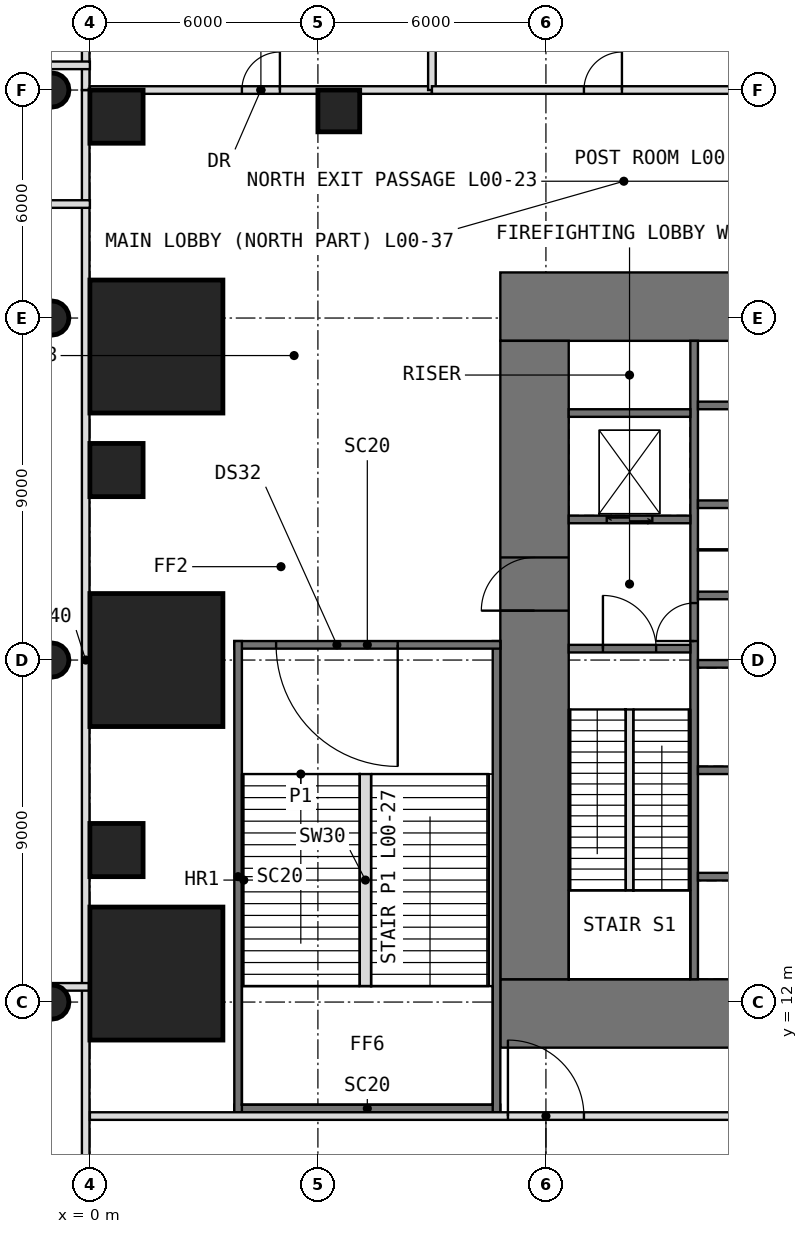
"""IFC4 building model, lengths in metres.
Left out: names, types, materials, properties, quantities, classifications, styles, units other than length and angle.
Written with IfcOpenShell. Run it as: python <this file> out.ifc"""

import sys

from ifc_helpers import new_model, si_unit, direction, frame, frame_2d, origin, origin_2d, place, context, subcontext, project, spatial, rectangle, circle, extrude, element, fill, save


model = new_model("IFC4")
c1 = context("Model", 3, precision=1e-05, world=origin(), true_north=direction((0.0, 1.0)))
c2 = subcontext(c1, "Body", "Model", "MODEL_VIEW")
j1 = project(units=[si_unit("LENGTHUNIT", "METRE"), si_unit("PLANEANGLEUNIT", "RADIAN")], contexts=[c1])
p1 = place(None, origin())
s1 = spatial("IfcSite", under=j1, at=p1, CompositionType="ELEMENT")
p2 = place(p1, origin())
s2 = spatial("IfcBuilding", under=s1, at=p2, CompositionType="ELEMENT")
p3 = place(p2, origin())
s3 = spatial("IfcBuildingStorey", under=s2, at=p3, CompositionType="ELEMENT", Elevation=0.0)
p4 = place(p3, frame((1.75, 12.75, -0.4), z_axis=(0.0, 0.0, 1.0), x_axis=(1.0, 0.0, 0.0)))
e1 = element("IfcColumn", 1, at=p4, inside=s3, PredefinedType="COLUMN", context=c2, shape_type="SweptSolid", body=[
    extrude(rectangle(XDim=3.5, YDim=3.5, at=origin_2d()), origin(), (0.0, 0.0, 1.0), 6.4),
])
p5 = place(p3, frame((-1.0, 12.0, -0.4), z_axis=(0.0, 0.0, 1.0), x_axis=(1.0, 0.0, 0.0)))
e2 = element("IfcColumn", 2, at=p5, inside=s3, PredefinedType="COLUMN", context=c2, shape_type="SweptSolid", body=[
    extrude(circle(Radius=0.45, at=origin_2d()), origin(), (0.0, 0.0, 1.0), 6.4),
])
p6 = place(p3, frame((0.7, 16.0, -0.4), z_axis=(0.0, 0.0, 1.0), x_axis=(1.0, 0.0, 0.0)))
e3 = element("IfcColumn", 3, at=p6, inside=s3, PredefinedType="COLUMN", context=c2, shape_type="SweptSolid", body=[
    extrude(rectangle(XDim=1.4, YDim=1.4, at=origin_2d()), origin(), (0.0, 0.0, 1.0), 6.4),
])
p7 = place(p3, frame((-1.0, 21.0, -0.4), z_axis=(0.0, 0.0, 1.0), x_axis=(1.0, 0.0, 0.0)))
e4 = element("IfcColumn", 4, at=p7, inside=s3, PredefinedType="COLUMN", context=c2, shape_type="SweptSolid", body=[
    extrude(circle(Radius=0.45, at=origin_2d()), origin(), (0.0, 0.0, 1.0), 6.4),
])
p8 = place(p3, frame((1.75, 21.0, -0.4), z_axis=(0.0, 0.0, 1.0), x_axis=(1.0, 0.0, 0.0)))
e5 = element("IfcColumn", 5, at=p8, inside=s3, PredefinedType="COLUMN", context=c2, shape_type="SweptSolid", body=[
    extrude(rectangle(XDim=3.5, YDim=3.5, at=origin_2d()), origin(), (0.0, 0.0, 1.0), 6.4),
])
p9 = place(p3, frame((0.7, 26.0, -0.4), z_axis=(0.0, 0.0, 1.0), x_axis=(1.0, 0.0, 0.0)))
e6 = element("IfcColumn", 6, at=p9, inside=s3, PredefinedType="COLUMN", context=c2, shape_type="SweptSolid", body=[
    extrude(rectangle(XDim=1.4, YDim=1.4, at=origin_2d()), origin(), (0.0, 0.0, 1.0), 6.4),
])
p10 = place(p3, frame((-1.0, 30.0, -0.4), z_axis=(0.0, 0.0, 1.0), x_axis=(1.0, 0.0, 0.0)))
e7 = element("IfcColumn", 7, at=p10, inside=s3, PredefinedType="COLUMN", context=c2, shape_type="SweptSolid", body=[
    extrude(circle(Radius=0.45, at=origin_2d()), origin(), (0.0, 0.0, 1.0), 6.4),
])
p11 = place(p3, frame((1.75, 29.25, -0.4), z_axis=(0.0, 0.0, 1.0), x_axis=(1.0, 0.0, 0.0)))
e8 = element("IfcColumn", 8, at=p11, inside=s3, PredefinedType="COLUMN", context=c2, shape_type="SweptSolid", body=[
    extrude(rectangle(XDim=3.5, YDim=3.5, at=origin_2d()), origin(), (0.0, 0.0, 1.0), 6.4),
])
p12 = place(p3, frame((-1.0, 36.0, -0.4), z_axis=(0.0, 0.0, 1.0), x_axis=(1.0, 0.0, 0.0)))
e9 = element("IfcColumn", 9, at=p12, inside=s3, PredefinedType="COLUMN", context=c2, shape_type="SweptSolid", body=[
    extrude(circle(Radius=0.45, at=origin_2d()), origin(), (0.0, 0.0, 1.0), 6.4),
])
p13 = place(p3, frame((0.7, 35.3, -0.4), z_axis=(0.0, 0.0, 1.0), x_axis=(1.0, 0.0, 0.0)))
e10 = element("IfcColumn", 10, at=p13, inside=s3, PredefinedType="COLUMN", context=c2, shape_type="SweptSolid", body=[
    extrude(rectangle(XDim=1.4, YDim=1.4, at=origin_2d()), origin(), (0.0, 0.0, 1.0), 6.4),
])
p14 = place(p3, frame((6.55, 35.45, -0.4), z_axis=(0.0, 0.0, 1.0), x_axis=(1.0, 0.0, 0.0)))
e11 = element("IfcColumn", 11, at=p14, inside=s3, PredefinedType="COLUMN", context=c2, shape_type="SweptSolid", body=[
    extrude(rectangle(XDim=1.1, YDim=1.1, at=origin_2d()), origin(), (0.0, 0.0, 1.0), 6.4),
])
p15 = place(p3, frame((10.8, 11.7, 0.0), z_axis=(0.0, 0.0, 1.0), x_axis=(1.0, 0.0, 0.0)))
e12 = element("IfcWall", 12, at=p15, inside=s3, PredefinedType="SHEAR", context=c2, shape_type="SweptSolid", body=[
    extrude(rectangle(XDim=20.4, YDim=1.8, at=frame_2d((10.2, 0.0))), origin(), (0.0, 0.0, 1.0), 5.8),
])
p16 = place(p15, frame((9.2, 0.0, 0.0)))
e13 = element("IfcOpeningElement", 13, at=p16, cuts=e12, PredefinedType="OPENING", context=c2, shape_type="SweptSolid", body=[
    extrude(rectangle(XDim=2.0, YDim=2.2, at=frame_2d((1.0, 1.1))), frame((0.0, 0.91, 0.0), z_axis=(0.0, -1.0, 0.0), x_axis=(1.0, 0.0, 0.0)), (0.0, 0.0, 1.0), 1.82),
])
p17 = place(p3, frame((10.8, 30.3, 0.0), z_axis=(0.0, 0.0, 1.0), x_axis=(1.0, 0.0, 0.0)))
e14 = element("IfcWall", 14, at=p17, inside=s3, PredefinedType="SHEAR", context=c2, shape_type="SweptSolid", body=[
    extrude(rectangle(XDim=20.4, YDim=1.8, at=frame_2d((10.2, 0.0))), origin(), (0.0, 0.0, 1.0), 5.8),
])
p18 = place(p17, frame((9.2, 0.0, 0.0)))
e15 = element("IfcOpeningElement", 15, at=p18, cuts=e14, PredefinedType="OPENING", context=c2, shape_type="SweptSolid", body=[
    extrude(rectangle(XDim=2.0, YDim=2.2, at=frame_2d((1.0, 1.1))), frame((0.0, 0.91, 0.0), z_axis=(0.0, -1.0, 0.0), x_axis=(1.0, 0.0, 0.0)), (0.0, 0.0, 1.0), 1.82),
])
p19 = place(p3, frame((11.7, 12.6, 0.0), z_axis=(0.0, 0.0, 1.0), x_axis=(0.0, 1.0, 0.0)))
e16 = element("IfcWall", 16, at=p19, inside=s3, PredefinedType="SHEAR", context=c2, shape_type="SweptSolid", body=[
    extrude(rectangle(XDim=16.8, YDim=1.8, at=frame_2d((8.4, 0.0))), origin(), (0.0, 0.0, 1.0), 5.8),
])
p20 = place(p19, frame((9.7, 0.0, 0.0)))
e17 = element("IfcOpeningElement", 17, at=p20, cuts=e16, PredefinedType="OPENING", context=c2, shape_type="SweptSolid", body=[
    extrude(rectangle(XDim=1.4, YDim=2.2, at=frame_2d((0.7, 1.1))), frame((0.0, 0.91, 0.0), z_axis=(0.0, -1.0, 0.0), x_axis=(1.0, 0.0, 0.0)), (0.0, 0.0, 1.0), 1.82),
])
p21 = place(p3, frame((15.9, 12.6, 0.0), z_axis=(0.0, 0.0, 1.0), x_axis=(0.0, 1.0, 0.0)))
e18 = element("IfcWall", 18, at=p21, inside=s3, PredefinedType="SHEAR", context=c2, shape_type="SweptSolid", body=[
    extrude(rectangle(XDim=16.8, YDim=0.2, at=frame_2d((8.4, 0.0))), origin(), (0.0, 0.0, 1.0), 5.8),
])
p22 = place(p21, frame((8.9, 0.0, 0.0)))
e19 = element("IfcOpeningElement", 19, at=p22, cuts=e18, PredefinedType="OPENING", context=c2, shape_type="SweptSolid", body=[
    extrude(rectangle(XDim=1.0, YDim=2.2, at=frame_2d((0.5, 1.1))), frame((0.0, 0.11, 0.0), z_axis=(0.0, -1.0, 0.0), x_axis=(1.0, 0.0, 0.0)), (0.0, 0.0, 1.0), 0.22),
])
p23 = place(p3, frame((12.6, 21.3, 0.0), z_axis=(0.0, 0.0, 1.0), x_axis=(1.0, 0.0, 0.0)))
e20 = element("IfcWall", 20, at=p23, inside=s3, PredefinedType="SHEAR", context=c2, shape_type="SweptSolid", body=[
    extrude(rectangle(XDim=3.2, YDim=0.2, at=frame_2d((1.6, 0.0))), origin(), (0.0, 0.0, 1.0), 5.8),
])
p24 = place(p23, frame((0.9, 0.0, 0.0)))
e21 = element("IfcOpeningElement", 21, at=p24, cuts=e20, PredefinedType="OPENING", context=c2, shape_type="SweptSolid", body=[
    extrude(rectangle(XDim=1.4, YDim=2.2, at=frame_2d((0.7, 1.1))), frame((0.0, 0.11, 0.0), z_axis=(0.0, -1.0, 0.0), x_axis=(1.0, 0.0, 0.0)), (0.0, 0.0, 1.0), 0.22),
])
p25 = place(p3, frame((12.6, 24.7, 0.0), z_axis=(0.0, 0.0, 1.0), x_axis=(1.0, 0.0, 0.0)))
e22 = element("IfcWall", 22, at=p25, inside=s3, PredefinedType="SHEAR", context=c2, shape_type="SweptSolid", body=[
    extrude(rectangle(XDim=3.2, YDim=0.2, at=frame_2d((1.6, 0.0))), origin(), (0.0, 0.0, 1.0), 5.8),
])
p26 = place(p25, frame((1.0, 0.0, 0.0)))
e23 = element("IfcOpeningElement", 23, at=p26, cuts=e22, PredefinedType="OPENING", context=c2, shape_type="SweptSolid", body=[
    extrude(rectangle(XDim=1.2, YDim=2.2, at=frame_2d((0.6, 1.1))), frame((0.0, 0.11, 0.0), z_axis=(0.0, -1.0, 0.0), x_axis=(1.0, 0.0, 0.0)), (0.0, 0.0, 1.0), 0.22),
])
for number, where, z_axis, x_axis in (
    (24, (12.6, 27.5, 0.0), (0.0, 0.0, 1.0), (1.0, 0.0, 0.0)),
    (25, (16.0, 15.3, 0.0), (0.0, 0.0, 1.0), (1.0, 0.0, 0.0)),
    (26, (16.0, 18.1, 0.0), (0.0, 0.0, 1.0), (1.0, 0.0, 0.0)),
    (27, (16.0, 20.9, 0.0), (0.0, 0.0, 1.0), (1.0, 0.0, 0.0)),
    (28, (16.0, 22.7, 0.0), (0.0, 0.0, 1.0), (1.0, 0.0, 0.0)),
    (29, (16.0, 25.1, 0.0), (0.0, 0.0, 1.0), (1.0, 0.0, 0.0)),
    (30, (16.0, 27.7, 0.0), (0.0, 0.0, 1.0), (1.0, 0.0, 0.0)),
):
    element("IfcWall", number, at=place(p3, frame(where, z_axis=z_axis, x_axis=x_axis)), inside=s3, PredefinedType="SHEAR", context=c2, shape_type="SweptSolid", body=[
        extrude(rectangle(XDim=3.2, YDim=0.2, at=frame_2d((1.6, 0.0))), origin(), (0.0, 0.0, 1.0), 5.8),
    ])
p27 = place(p3, frame((16.0, 23.9, 0.0), z_axis=(0.0, 0.0, 1.0), x_axis=(1.0, 0.0, 0.0)))
e31 = element("IfcWall", 31, at=p27, inside=s3, PredefinedType="PARTITIONING", context=c2, shape_type="SweptSolid", body=[
    extrude(rectangle(XDim=1.4, YDim=0.03, at=frame_2d((0.7, 0.0))), origin(), (0.0, 0.0, 1.0), 5.6),
])
p28 = place(p3, frame((3.8, 9.2, 0.0), z_axis=(0.0, 0.0, 1.0), x_axis=(1.0, 0.0, 0.0)))
e32 = element("IfcWall", 32, at=p28, inside=s3, PredefinedType="SOLIDWALL", context=c2, shape_type="SweptSolid", body=[
    extrude(rectangle(XDim=7.0, YDim=0.2, at=frame_2d((3.5, 0.0))), origin(), (0.0, 0.0, 1.0), 5.8),
])
p29 = place(p3, frame((10.7, 9.1, 0.0), z_axis=(0.0, 0.0, 1.0), x_axis=(0.0, 1.0, 0.0)))
e33 = element("IfcWall", 33, at=p29, inside=s3, PredefinedType="SOLIDWALL", context=c2, shape_type="SweptSolid", body=[
    extrude(rectangle(XDim=12.4, YDim=0.2, at=frame_2d((6.2, 0.0))), origin(), (0.0, 0.0, 1.0), 5.8),
])
p30 = place(p3, frame((10.8, 21.4, 0.0), z_axis=(0.0, 0.0, 1.0), x_axis=(-1.0, 0.0, 0.0)))
e34 = element("IfcWall", 34, at=p30, inside=s3, PredefinedType="SOLIDWALL", context=c2, shape_type="SweptSolid", body=[
    extrude(rectangle(XDim=7.0, YDim=0.2, at=frame_2d((3.5, 0.0))), origin(), (0.0, 0.0, 1.0), 5.8),
])
p31 = place(p30, frame((2.7, 0.0, 0.0)))
e35 = element("IfcOpeningElement", 35, at=p31, cuts=e34, PredefinedType="OPENING", context=c2, shape_type="SweptSolid", body=[
    extrude(rectangle(XDim=3.2, YDim=2.4, at=frame_2d((1.6, 1.2))), frame((0.0, 0.11, 0.0), z_axis=(0.0, -1.0, 0.0), x_axis=(1.0, 0.0, 0.0)), (0.0, 0.0, 1.0), 0.22),
])
p32 = place(p3, frame((3.9, 21.5, 0.0), z_axis=(0.0, 0.0, 1.0), x_axis=(0.0, -1.0, 0.0)))
e36 = element("IfcWall", 36, at=p32, inside=s3, PredefinedType="SOLIDWALL", context=c2, shape_type="SweptSolid", body=[
    extrude(rectangle(XDim=12.4, YDim=0.2, at=frame_2d((6.2, 0.0))), origin(), (0.0, 0.0, 1.0), 5.8),
])
p33 = place(p3, frame((-0.11, 6.0, 0.0), z_axis=(0.0, 0.0, 1.0), x_axis=(0.0, 1.0, 0.0)))
e37 = element("IfcWall", 37, at=p33, inside=s3, PredefinedType="PARTITIONING", context=c2, shape_type="SweptSolid", body=[
    extrude(rectangle(XDim=30.0, YDim=0.2, at=frame_2d((15.0, 0.0))), origin(), (0.0, 0.0, 1.0), 5.6),
])
p34 = place(p3, frame((-0.11, 36.0, 0.0), z_axis=(0.0, 0.0, 1.0), x_axis=(0.0, 1.0, 0.0)))
e38 = element("IfcWall", 38, at=p34, inside=s3, PredefinedType="PARTITIONING", context=c2, shape_type="SweptSolid", body=[
    extrude(rectangle(XDim=6.0, YDim=0.2, at=frame_2d((3.0, 0.0))), origin(), (0.0, 0.0, 1.0), 4.98),
])
p35 = place(p3, frame((-21.0, 12.4, 0.0), z_axis=(0.0, 0.0, 1.0), x_axis=(1.0, 0.0, 0.0)))
e39 = element("IfcWall", 39, at=p35, inside=s3, PredefinedType="PARTITIONING", context=c2, shape_type="SweptSolid", body=[
    extrude(rectangle(XDim=21.0, YDim=0.2, at=frame_2d((10.5, 0.0))), origin(), (0.0, 0.0, 1.0), 5.6),
])
p36 = place(p35, frame((11.5, 0.0, 0.0)))
e40 = element("IfcOpeningElement", 40, at=p36, cuts=e39, PredefinedType="OPENING", context=c2, shape_type="SweptSolid", body=[
    extrude(rectangle(XDim=1.0, YDim=2.2, at=frame_2d((0.5, 1.1))), frame((0.0, 0.11, 0.0), z_axis=(0.0, -1.0, 0.0), x_axis=(1.0, 0.0, 0.0)), (0.0, 0.0, 1.0), 0.22),
])
p37 = place(p3, frame((-21.0, 33.0, 0.0), z_axis=(0.0, 0.0, 1.0), x_axis=(1.0, 0.0, 0.0)))
e41 = element("IfcWall", 41, at=p37, inside=s3, PredefinedType="PARTITIONING", context=c2, shape_type="SweptSolid", body=[
    extrude(rectangle(XDim=21.0, YDim=0.2, at=frame_2d((10.5, 0.0))), origin(), (0.0, 0.0, 1.0), 5.6),
])
p38 = place(p37, frame((10.0, 0.0, 0.0)))
e42 = element("IfcOpeningElement", 42, at=p38, cuts=e41, PredefinedType="OPENING", context=c2, shape_type="SweptSolid", body=[
    extrude(rectangle(XDim=1.0, YDim=2.2, at=frame_2d((0.5, 1.1))), frame((0.0, 0.11, 0.0), z_axis=(0.0, -1.0, 0.0), x_axis=(1.0, 0.0, 0.0)), (0.0, 0.0, 1.0), 0.22),
])
p39 = place(p3, frame((-3.4, 36.65, 0.0), z_axis=(0.0, 0.0, 1.0), x_axis=(1.0, 0.0, 0.0)))
e43 = element("IfcWall", 43, at=p39, inside=s3, PredefinedType="PARTITIONING", context=c2, shape_type="SweptSolid", body=[
    extrude(rectangle(XDim=3.4, YDim=0.2, at=frame_2d((1.7, 0.0))), origin(), (0.0, 0.0, 1.0), 5.6),
])
p40 = place(p39, frame((0.45, 0.0, 0.0)))
e44 = element("IfcOpeningElement", 44, at=p40, cuts=e43, PredefinedType="OPENING", context=c2, shape_type="SweptSolid", body=[
    extrude(rectangle(XDim=1.0, YDim=2.2, at=frame_2d((0.5, 1.1))), frame((0.0, 0.11, 0.0), z_axis=(0.0, -1.0, 0.0), x_axis=(1.0, 0.0, 0.0)), (0.0, 0.0, 1.0), 0.22),
])
p41 = place(p3, frame((0.0, 9.0, 0.0), z_axis=(0.0, 0.0, 1.0), x_axis=(1.0, 0.0, 0.0)))
e45 = element("IfcWall", 45, at=p41, inside=s3, PredefinedType="PARTITIONING", context=c2, shape_type="SweptSolid", body=[
    extrude(rectangle(XDim=42.0, YDim=0.2, at=frame_2d((21.0, 0.0))), origin(), (0.0, 0.0, 1.0), 5.6),
])
p42 = place(p41, frame((11.0, 0.0, 0.0)))
e46 = element("IfcOpeningElement", 46, at=p42, cuts=e45, PredefinedType="OPENING", context=c2, shape_type="SweptSolid", body=[
    extrude(rectangle(XDim=2.0, YDim=2.2, at=frame_2d((1.0, 1.1))), frame((0.0, 0.11, 0.0), z_axis=(0.0, -1.0, 0.0), x_axis=(1.0, 0.0, 0.0)), (0.0, 0.0, 1.0), 0.22),
])
p43 = place(p41, frame((32.0, 0.0, 0.0)))
e47 = element("IfcOpeningElement", 47, at=p43, cuts=e45, PredefinedType="OPENING", context=c2, shape_type="SweptSolid", body=[
    extrude(rectangle(XDim=2.0, YDim=2.2, at=frame_2d((1.0, 1.1))), frame((0.0, 0.11, 0.0), z_axis=(0.0, -1.0, 0.0), x_axis=(1.0, 0.0, 0.0)), (0.0, 0.0, 1.0), 0.22),
])
p44 = place(p3, frame((0.0, 36.0, 0.0), z_axis=(0.0, 0.0, 1.0), x_axis=(1.0, 0.0, 0.0)))
e48 = element("IfcWall", 48, at=p44, inside=s3, PredefinedType="PARTITIONING", context=c2, shape_type="SweptSolid", body=[
    extrude(rectangle(XDim=9.0, YDim=0.2, at=frame_2d((4.5, 0.0))), origin(), (0.0, 0.0, 1.0), 5.6),
])
p45 = place(p44, frame((4.0, 0.0, 0.0)))
e49 = element("IfcOpeningElement", 49, at=p45, cuts=e48, PredefinedType="OPENING", context=c2, shape_type="SweptSolid", body=[
    extrude(rectangle(XDim=1.0, YDim=2.2, at=frame_2d((0.5, 1.1))), frame((0.0, 0.11, 0.0), z_axis=(0.0, -1.0, 0.0), x_axis=(1.0, 0.0, 0.0)), (0.0, 0.0, 1.0), 0.22),
])
p46 = place(p3, frame((9.0, 36.0, 0.0), z_axis=(0.0, 0.0, 1.0), x_axis=(0.0, 1.0, 0.0)))
e50 = element("IfcWall", 50, at=p46, inside=s3, PredefinedType="PARTITIONING", context=c2, shape_type="SweptSolid", body=[
    extrude(rectangle(XDim=6.0, YDim=0.2, at=frame_2d((3.0, 0.0))), origin(), (0.0, 0.0, 1.0), 5.6),
])
p47 = place(p3, frame((9.0, 36.0, 0.0), z_axis=(0.0, 0.0, 1.0), x_axis=(1.0, 0.0, 0.0)))
e51 = element("IfcWall", 51, at=p47, inside=s3, PredefinedType="PARTITIONING", context=c2, shape_type="SweptSolid", body=[
    extrude(rectangle(XDim=9.0, YDim=0.2, at=frame_2d((4.5, 0.0))), origin(), (0.0, 0.0, 1.0), 5.6),
])
p48 = place(p47, frame((4.0, 0.0, 0.0)))
e52 = element("IfcOpeningElement", 52, at=p48, cuts=e51, PredefinedType="OPENING", context=c2, shape_type="SweptSolid", body=[
    extrude(rectangle(XDim=1.0, YDim=2.2, at=frame_2d((0.5, 1.1))), frame((0.0, 0.11, 0.0), z_axis=(0.0, -1.0, 0.0), x_axis=(1.0, 0.0, 0.0)), (0.0, 0.0, 1.0), 0.22),
])
p49 = place(p3, frame((14.2, 14.94, 0.0), z_axis=(0.0, 0.0, 1.0), x_axis=(0.0, 1.0, 0.0)))
e53 = element("IfcWall", 53, at=p49, inside=s3, PredefinedType="PARTITIONING", context=c2, shape_type="SweptSolid", body=[
    extrude(rectangle(XDim=4.76, YDim=0.2, at=frame_2d((2.38, 0.0))), origin(), (0.0, 0.0, 1.0), 6.0),
])
p50 = place(p3, frame((7.25, 12.42, 0.0), z_axis=(0.0, 0.0, 1.0), x_axis=(0.0, 1.0, 0.0)))
e54 = element("IfcWall", 54, at=p50, inside=s3, PredefinedType="PARTITIONING", context=c2, shape_type="SweptSolid", body=[
    extrude(rectangle(XDim=5.58, YDim=0.3, at=frame_2d((2.79, 0.0))), origin(), (0.0, 0.0, 1.0), 6.0),
])
p51 = place(p20, origin())
e55 = element("IfcDoor", 55, at=p51, inside=s3, OperationType="SINGLE_SWING_LEFT", PredefinedType="DOOR", context=c2, shape_type="SweptSolid", body=[
    extrude(rectangle(XDim=1.4, YDim=2.2, at=frame_2d((0.7, 1.1))), frame((0.0, 0.025, 0.0), z_axis=(0.0, -1.0, 0.0), x_axis=(1.0, 0.0, 0.0)), (0.0, 0.0, 1.0), 0.05),
])
fill(e17, e55)
p52 = place(p24, origin())
e56 = element("IfcDoor", 56, at=p52, inside=s3, OperationType="SINGLE_SWING_LEFT", PredefinedType="DOOR", context=c2, shape_type="SweptSolid", body=[
    extrude(rectangle(XDim=1.4, YDim=2.2, at=frame_2d((0.7, 1.1))), frame((0.0, 0.025, 0.0), z_axis=(0.0, -1.0, 0.0), x_axis=(1.0, 0.0, 0.0)), (0.0, 0.0, 1.0), 0.05),
])
fill(e21, e56)
p53 = place(p22, origin())
e57 = element("IfcDoor", 57, at=p53, inside=s3, OperationType="SINGLE_SWING_LEFT", PredefinedType="DOOR", context=c2, shape_type="SweptSolid", body=[
    extrude(rectangle(XDim=1.0, YDim=2.2, at=frame_2d((0.5, 1.1))), frame((0.0, 0.025, 0.0), z_axis=(0.0, -1.0, 0.0), x_axis=(1.0, 0.0, 0.0)), (0.0, 0.0, 1.0), 0.05),
])
fill(e19, e57)
p54 = place(p31, origin())
e58 = element("IfcDoor", 58, at=p54, inside=s3, OperationType="DOUBLE_DOOR_SINGLE_SWING", PredefinedType="DOOR", context=c2, shape_type="SweptSolid", body=[
    extrude(rectangle(XDim=3.2, YDim=2.4, at=frame_2d((1.6, 1.2))), frame((0.0, 0.025, 0.0), z_axis=(0.0, -1.0, 0.0), x_axis=(1.0, 0.0, 0.0)), (0.0, 0.0, 1.0), 0.05),
])
fill(e35, e58)
p55 = place(p45, origin())
e59 = element("IfcDoor", 59, at=p55, inside=s3, OperationType="SINGLE_SWING_RIGHT", PredefinedType="DOOR", context=c2, shape_type="SweptSolid", body=[
    extrude(rectangle(XDim=1.0, YDim=2.2, at=frame_2d((0.5, 1.1))), frame((0.0, 0.025, 0.0), z_axis=(0.0, -1.0, 0.0), x_axis=(1.0, 0.0, 0.0)), (0.0, 0.0, 1.0), 0.05),
])
fill(e49, e59)
p56 = place(p48, origin())
e60 = element("IfcDoor", 60, at=p56, inside=s3, OperationType="SINGLE_SWING_RIGHT", PredefinedType="DOOR", context=c2, shape_type="SweptSolid", body=[
    extrude(rectangle(XDim=1.0, YDim=2.2, at=frame_2d((0.5, 1.1))), frame((0.0, 0.025, 0.0), z_axis=(0.0, -1.0, 0.0), x_axis=(1.0, 0.0, 0.0)), (0.0, 0.0, 1.0), 0.05),
])
fill(e52, e60)
p57 = place(p42, origin())
e61 = element("IfcDoor", 61, at=p57, inside=s3, OperationType="DOUBLE_DOOR_SINGLE_SWING", PredefinedType="DOOR", context=c2, shape_type="SweptSolid", body=[
    extrude(rectangle(XDim=2.0, YDim=2.2, at=frame_2d((1.0, 1.1))), frame((0.0, 0.025, 0.0), z_axis=(0.0, -1.0, 0.0), x_axis=(1.0, 0.0, 0.0)), (0.0, 0.0, 1.0), 0.05),
])
fill(e46, e61)
p58 = place(p26, origin())
e62 = element("IfcDoor", 62, at=p58, inside=s3, OperationType="DOUBLE_DOOR_SLIDING", PredefinedType="DOOR", context=c2, shape_type="SweptSolid", body=[
    extrude(rectangle(XDim=1.2, YDim=2.2, at=frame_2d((0.6, 1.1))), frame((0.0, 0.025, 0.0), z_axis=(0.0, -1.0, 0.0), x_axis=(1.0, 0.0, 0.0)), (0.0, 0.0, 1.0), 0.05),
])
fill(e23, e62)
save(model, sys.argv[1])
